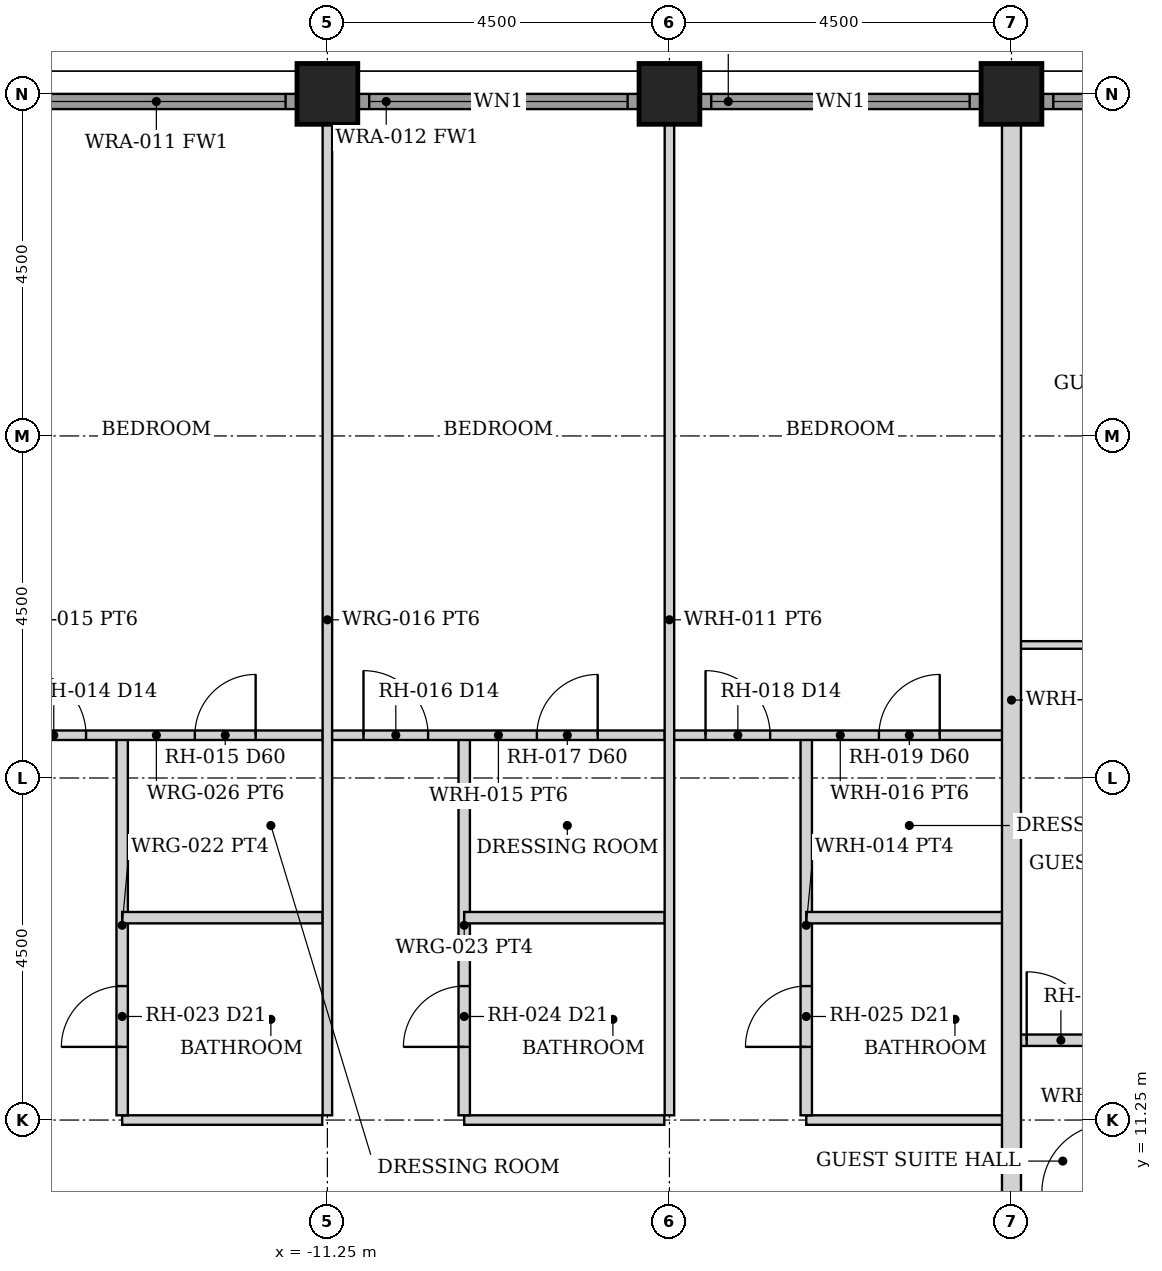
"""IFC4 building model, lengths in metres.
Left out: names, types, materials, properties, quantities, classifications, styles, units other than length and angle.
Written with IfcOpenShell. Run it as: python <this file> out.ifc"""

import sys

from ifc_helpers import new_model, si_unit, direction, frame, frame_2d, origin, origin_2d, place, context, subcontext, project, spatial, rectangle, hollow_rectangle, extrude, element, fill, save


model = new_model("IFC4")
c1 = context("Model", 3, precision=1e-05, world=origin(), true_north=direction((0.0, 1.0)))
c2 = subcontext(c1, "Body", "Model", "MODEL_VIEW")
j1 = project(units=[si_unit("LENGTHUNIT", "METRE"), si_unit("PLANEANGLEUNIT", "RADIAN")], contexts=[c1])
p1 = place(None, origin())
s1 = spatial("IfcSite", under=j1, at=p1, CompositionType="ELEMENT")
p2 = place(p1, origin())
s2 = spatial("IfcBuilding", under=s1, at=p2, CompositionType="ELEMENT")
p3 = place(p2, frame((0.0, 0.0, 100.0)))
s3 = spatial("IfcBuildingStorey", under=s2, at=p3, CompositionType="ELEMENT", Elevation=100.0)
for number, where, z_axis, x_axis in (
    (1, (-11.25, 24.75, 0.0), (0.0, 0.0, 1.0), (0.0, 1.0, 0.0)),
    (2, (-6.75, 24.75, 0.0), (0.0, 0.0, 1.0), (0.0, 1.0, 0.0)),
    (3, (-2.25, 24.75, 0.0), (0.0, 0.0, 1.0), (0.0, 1.0, 0.0)),
):
    element("IfcColumn", number, at=place(p3, frame(where, z_axis=z_axis, x_axis=x_axis)), inside=s3, PredefinedType="COLUMN", context=c2, shape_type="SweptSolid", body=[
        extrude(hollow_rectangle(XDim=0.8, YDim=0.8, WallThickness=0.06, at=origin_2d()), origin(), (0.0, 0.0, 1.0), 3.5),
    ])
p4 = place(p3, frame((-15.345, 24.65, 0.0), z_axis=(0.0, 0.0, 1.0), x_axis=(1.0, 0.0, 0.0)))
e4 = element("IfcWall", 4, at=p4, inside=s3, PredefinedType="SOLIDWALL", context=c2, shape_type="SweptSolid", body=[
    extrude(rectangle(XDim=3.69, YDim=0.2, at=frame_2d((1.845, 0.0))), origin(), (0.0, 0.0, 1.0), 2.379),
])
p5 = place(p4, frame((0.145, 0.0, 0.3)))
e5 = element("IfcOpeningElement", 5, at=p5, cuts=e4, PredefinedType="OPENING", context=c2, shape_type="SweptSolid", body=[
    extrude(rectangle(XDim=3.4, YDim=1.929, at=frame_2d((1.7, 0.964))), frame((0.0, 0.11, 0.0), z_axis=(0.0, -1.0, 0.0), x_axis=(1.0, 0.0, 0.0)), (0.0, 0.0, 1.0), 0.22),
])
p6 = place(p3, frame((-10.845, 24.65, 0.0), z_axis=(0.0, 0.0, 1.0), x_axis=(1.0, 0.0, 0.0)))
e6 = element("IfcWall", 6, at=p6, inside=s3, PredefinedType="SOLIDWALL", context=c2, shape_type="SweptSolid", body=[
    extrude(rectangle(XDim=3.69, YDim=0.2, at=frame_2d((1.845, 0.0))), origin(), (0.0, 0.0, 1.0), 2.379),
])
p7 = place(p6, frame((0.145, 0.0, 0.3)))
e7 = element("IfcOpeningElement", 7, at=p7, cuts=e6, PredefinedType="OPENING", context=c2, shape_type="SweptSolid", body=[
    extrude(rectangle(XDim=3.4, YDim=1.929, at=frame_2d((1.7, 0.964))), frame((0.0, 0.11, 0.0), z_axis=(0.0, -1.0, 0.0), x_axis=(1.0, 0.0, 0.0)), (0.0, 0.0, 1.0), 0.22),
])
p8 = place(p3, frame((-6.345, 24.65, 0.0), z_axis=(0.0, 0.0, 1.0), x_axis=(1.0, 0.0, 0.0)))
e8 = element("IfcWall", 8, at=p8, inside=s3, PredefinedType="SOLIDWALL", context=c2, shape_type="SweptSolid", body=[
    extrude(rectangle(XDim=3.69, YDim=0.2, at=frame_2d((1.845, 0.0))), origin(), (0.0, 0.0, 1.0), 2.379),
])
p9 = place(p8, frame((0.145, 0.0, 0.3)))
e9 = element("IfcOpeningElement", 9, at=p9, cuts=e8, PredefinedType="OPENING", context=c2, shape_type="SweptSolid", body=[
    extrude(rectangle(XDim=3.4, YDim=1.929, at=frame_2d((1.7, 0.964))), frame((0.0, 0.11, 0.0), z_axis=(0.0, -1.0, 0.0), x_axis=(1.0, 0.0, 0.0)), (0.0, 0.0, 1.0), 0.22),
])
p10 = place(p3, frame((-1.845, 24.65, 0.0), z_axis=(0.0, 0.0, 1.0), x_axis=(1.0, 0.0, 0.0)))
e10 = element("IfcWall", 10, at=p10, inside=s3, PredefinedType="SOLIDWALL", context=c2, shape_type="SweptSolid", body=[
    extrude(rectangle(XDim=3.69, YDim=0.2, at=frame_2d((1.845, 0.0))), origin(), (0.0, 0.0, 1.0), 2.379),
])
p11 = place(p10, frame((0.145, 0.0, 0.3)))
e11 = element("IfcOpeningElement", 11, at=p11, cuts=e10, PredefinedType="OPENING", context=c2, shape_type="SweptSolid", body=[
    extrude(rectangle(XDim=3.4, YDim=1.929, at=frame_2d((1.7, 0.964))), frame((0.0, 0.11, 0.0), z_axis=(0.0, -1.0, 0.0), x_axis=(1.0, 0.0, 0.0)), (0.0, 0.0, 1.0), 0.22),
])
p12 = place(p3, frame((-13.95, 11.25, 0.0), z_axis=(0.0, 0.0, 1.0), x_axis=(1.0, 0.0, 0.0)))
e12 = element("IfcWall", 12, at=p12, inside=s3, PredefinedType="PARTITIONING", context=c2, shape_type="SweptSolid", body=[
    extrude(rectangle(XDim=2.633, YDim=0.125, at=frame_2d((1.316, 0.0))), origin(), (0.0, 0.0, 1.0), 2.373),
])
p13 = place(p3, frame((-13.95, 11.312, 0.0), z_axis=(0.0, 0.0, 1.0), x_axis=(0.0, 1.0, 0.0)))
e13 = element("IfcWall", 13, at=p13, inside=s3, PredefinedType="PARTITIONING", context=c2, shape_type="SweptSolid", body=[
    extrude(rectangle(XDim=5.0, YDim=0.15, at=frame_2d((2.5, 0.0))), origin(), (0.0, 0.0, 1.0), 2.373),
])
p14 = place(p13, frame((0.9, 0.0, 0.0)))
e14 = element("IfcOpeningElement", 14, at=p14, cuts=e13, PredefinedType="OPENING", context=c2, shape_type="SweptSolid", body=[
    extrude(rectangle(XDim=0.8, YDim=2.1, at=frame_2d((0.4, 1.05))), frame((0.0, 0.085, 0.0), z_axis=(0.0, -1.0, 0.0), x_axis=(1.0, 0.0, 0.0)), (0.0, 0.0, 1.0), 0.17),
])
p15 = place(p3, frame((-15.688, 16.312, 0.0), z_axis=(0.0, 0.0, 1.0), x_axis=(1.0, 0.0, 0.0)))
e15 = element("IfcWall", 15, at=p15, inside=s3, PredefinedType="PARTITIONING", context=c2, shape_type="SweptSolid", body=[
    extrude(rectangle(XDim=4.375, YDim=0.125, at=frame_2d((2.188, 0.0))), origin(), (0.0, 0.0, 1.0), 2.373),
])
p16 = place(p15, frame((0.413, 0.0, 0.0)))
e16 = element("IfcOpeningElement", 16, at=p16, cuts=e15, PredefinedType="OPENING", context=c2, shape_type="SweptSolid", body=[
    extrude(rectangle(XDim=0.85, YDim=2.1, at=frame_2d((0.425, 1.05))), frame((0.0, 0.073, 0.0), z_axis=(0.0, -1.0, 0.0), x_axis=(1.0, 0.0, 0.0)), (0.0, 0.0, 1.0), 0.145),
])
p17 = place(p15, frame((2.694, 0.0, 0.0)))
e17 = element("IfcOpeningElement", 17, at=p17, cuts=e15, PredefinedType="OPENING", context=c2, shape_type="SweptSolid", body=[
    extrude(rectangle(XDim=0.8, YDim=2.1, at=frame_2d((0.4, 1.05))), frame((0.0, 0.073, 0.0), z_axis=(0.0, -1.0, 0.0), x_axis=(1.0, 0.0, 0.0)), (0.0, 0.0, 1.0), 0.145),
])
p18 = place(p3, frame((-13.95, 13.913, 0.0), z_axis=(0.0, 0.0, 1.0), x_axis=(1.0, 0.0, 0.0)))
e18 = element("IfcWall", 18, at=p18, inside=s3, PredefinedType="PARTITIONING", context=c2, shape_type="SweptSolid", body=[
    extrude(rectangle(XDim=2.637, YDim=0.15, at=frame_2d((1.319, 0.0))), origin(), (0.0, 0.0, 1.0), 2.373),
])
p19 = place(p3, frame((-11.25, 11.312, 0.0), z_axis=(0.0, 0.0, 1.0), x_axis=(0.0, 1.0, 0.0)))
e19 = element("IfcWall", 19, at=p19, inside=s3, PredefinedType="PARTITIONING", context=c2, shape_type="SweptSolid", body=[
    extrude(rectangle(XDim=13.038, YDim=0.125, at=frame_2d((6.519, 0.0))), origin(), (0.0, 0.0, 1.0), 2.373),
])
p20 = place(p3, frame((-9.45, 11.25, 0.0), z_axis=(0.0, 0.0, 1.0), x_axis=(1.0, 0.0, 0.0)))
e20 = element("IfcWall", 20, at=p20, inside=s3, PredefinedType="PARTITIONING", context=c2, shape_type="SweptSolid", body=[
    extrude(rectangle(XDim=2.633, YDim=0.125, at=frame_2d((1.316, 0.0))), origin(), (0.0, 0.0, 1.0), 2.373),
])
p21 = place(p3, frame((-9.45, 11.312, 0.0), z_axis=(0.0, 0.0, 1.0), x_axis=(0.0, 1.0, 0.0)))
e21 = element("IfcWall", 21, at=p21, inside=s3, PredefinedType="PARTITIONING", context=c2, shape_type="SweptSolid", body=[
    extrude(rectangle(XDim=5.0, YDim=0.15, at=frame_2d((2.5, 0.0))), origin(), (0.0, 0.0, 1.0), 2.373),
])
p22 = place(p21, frame((0.9, 0.0, 0.0)))
e22 = element("IfcOpeningElement", 22, at=p22, cuts=e21, PredefinedType="OPENING", context=c2, shape_type="SweptSolid", body=[
    extrude(rectangle(XDim=0.8, YDim=2.1, at=frame_2d((0.4, 1.05))), frame((0.0, 0.085, 0.0), z_axis=(0.0, -1.0, 0.0), x_axis=(1.0, 0.0, 0.0)), (0.0, 0.0, 1.0), 0.17),
])
p23 = place(p3, frame((-11.188, 16.312, 0.0), z_axis=(0.0, 0.0, 1.0), x_axis=(1.0, 0.0, 0.0)))
e23 = element("IfcWall", 23, at=p23, inside=s3, PredefinedType="PARTITIONING", context=c2, shape_type="SweptSolid", body=[
    extrude(rectangle(XDim=4.375, YDim=0.125, at=frame_2d((2.188, 0.0))), origin(), (0.0, 0.0, 1.0), 2.373),
])
p24 = place(p23, frame((0.413, 0.0, 0.0)))
e24 = element("IfcOpeningElement", 24, at=p24, cuts=e23, PredefinedType="OPENING", context=c2, shape_type="SweptSolid", body=[
    extrude(rectangle(XDim=0.85, YDim=2.1, at=frame_2d((0.425, 1.05))), frame((0.0, 0.073, 0.0), z_axis=(0.0, -1.0, 0.0), x_axis=(1.0, 0.0, 0.0)), (0.0, 0.0, 1.0), 0.145),
])
p25 = place(p23, frame((2.694, 0.0, 0.0)))
e25 = element("IfcOpeningElement", 25, at=p25, cuts=e23, PredefinedType="OPENING", context=c2, shape_type="SweptSolid", body=[
    extrude(rectangle(XDim=0.8, YDim=2.1, at=frame_2d((0.4, 1.05))), frame((0.0, 0.073, 0.0), z_axis=(0.0, -1.0, 0.0), x_axis=(1.0, 0.0, 0.0)), (0.0, 0.0, 1.0), 0.145),
])
p26 = place(p3, frame((-9.45, 13.913, 0.0), z_axis=(0.0, 0.0, 1.0), x_axis=(1.0, 0.0, 0.0)))
e26 = element("IfcWall", 26, at=p26, inside=s3, PredefinedType="PARTITIONING", context=c2, shape_type="SweptSolid", body=[
    extrude(rectangle(XDim=2.637, YDim=0.15, at=frame_2d((1.319, 0.0))), origin(), (0.0, 0.0, 1.0), 2.373),
])
p27 = place(p3, frame((-6.75, 11.312, 0.0), z_axis=(0.0, 0.0, 1.0), x_axis=(0.0, 1.0, 0.0)))
e27 = element("IfcWall", 27, at=p27, inside=s3, PredefinedType="PARTITIONING", context=c2, shape_type="SweptSolid", body=[
    extrude(rectangle(XDim=13.038, YDim=0.125, at=frame_2d((6.519, 0.0))), origin(), (0.0, 0.0, 1.0), 2.373),
])
p28 = place(p3, frame((-4.95, 11.25, 0.0), z_axis=(0.0, 0.0, 1.0), x_axis=(1.0, 0.0, 0.0)))
e28 = element("IfcWall", 28, at=p28, inside=s3, PredefinedType="PARTITIONING", context=c2, shape_type="SweptSolid", body=[
    extrude(rectangle(XDim=2.633, YDim=0.125, at=frame_2d((1.316, 0.0))), origin(), (0.0, 0.0, 1.0), 2.373),
])
p29 = place(p3, frame((-4.95, 11.312, 0.0), z_axis=(0.0, 0.0, 1.0), x_axis=(0.0, 1.0, 0.0)))
e29 = element("IfcWall", 29, at=p29, inside=s3, PredefinedType="PARTITIONING", context=c2, shape_type="SweptSolid", body=[
    extrude(rectangle(XDim=5.0, YDim=0.15, at=frame_2d((2.5, 0.0))), origin(), (0.0, 0.0, 1.0), 2.373),
])
p30 = place(p29, frame((0.9, 0.0, 0.0)))
e30 = element("IfcOpeningElement", 30, at=p30, cuts=e29, PredefinedType="OPENING", context=c2, shape_type="SweptSolid", body=[
    extrude(rectangle(XDim=0.8, YDim=2.1, at=frame_2d((0.4, 1.05))), frame((0.0, 0.085, 0.0), z_axis=(0.0, -1.0, 0.0), x_axis=(1.0, 0.0, 0.0)), (0.0, 0.0, 1.0), 0.17),
])
p31 = place(p3, frame((-6.688, 16.312, 0.0), z_axis=(0.0, 0.0, 1.0), x_axis=(1.0, 0.0, 0.0)))
e31 = element("IfcWall", 31, at=p31, inside=s3, PredefinedType="PARTITIONING", context=c2, shape_type="SweptSolid", body=[
    extrude(rectangle(XDim=4.37, YDim=0.125, at=frame_2d((2.185, 0.0))), origin(), (0.0, 0.0, 1.0), 2.373),
])
p32 = place(p31, frame((0.413, 0.0, 0.0)))
e32 = element("IfcOpeningElement", 32, at=p32, cuts=e31, PredefinedType="OPENING", context=c2, shape_type="SweptSolid", body=[
    extrude(rectangle(XDim=0.85, YDim=2.1, at=frame_2d((0.425, 1.05))), frame((0.0, 0.073, 0.0), z_axis=(0.0, -1.0, 0.0), x_axis=(1.0, 0.0, 0.0)), (0.0, 0.0, 1.0), 0.145),
])
p33 = place(p31, frame((2.694, 0.0, 0.0)))
e33 = element("IfcOpeningElement", 33, at=p33, cuts=e31, PredefinedType="OPENING", context=c2, shape_type="SweptSolid", body=[
    extrude(rectangle(XDim=0.8, YDim=2.1, at=frame_2d((0.4, 1.05))), frame((0.0, 0.073, 0.0), z_axis=(0.0, -1.0, 0.0), x_axis=(1.0, 0.0, 0.0)), (0.0, 0.0, 1.0), 0.145),
])
p34 = place(p3, frame((-4.95, 13.913, 0.0), z_axis=(0.0, 0.0, 1.0), x_axis=(1.0, 0.0, 0.0)))
e34 = element("IfcWall", 34, at=p34, inside=s3, PredefinedType="PARTITIONING", context=c2, shape_type="SweptSolid", body=[
    extrude(rectangle(XDim=2.633, YDim=0.15, at=frame_2d((1.316, 0.0))), origin(), (0.0, 0.0, 1.0), 2.373),
])
p35 = place(p3, frame((-2.15, 12.3, 0.0), z_axis=(0.0, 0.0, 1.0), x_axis=(1.0, 0.0, 0.0)))
e35 = element("IfcWall", 35, at=p35, inside=s3, PredefinedType="PARTITIONING", context=c2, shape_type="SweptSolid", body=[
    extrude(rectangle(XDim=4.3, YDim=0.15, at=frame_2d((2.15, 0.0))), origin(), (0.0, 0.0, 1.0), 2.373),
])
p36 = place(p35, frame((0.1, 0.0, 0.0)))
e36 = element("IfcOpeningElement", 36, at=p36, cuts=e35, PredefinedType="OPENING", context=c2, shape_type="SweptSolid", body=[
    extrude(rectangle(XDim=0.9, YDim=2.1, at=frame_2d((0.45, 1.05))), frame((0.0, 0.085, 0.0), z_axis=(0.0, -1.0, 0.0), x_axis=(1.0, 0.0, 0.0)), (0.0, 0.0, 1.0), 0.17),
])
p37 = place(p3, frame((-2.15, 17.5, 0.0), z_axis=(0.0, 0.0, 1.0), x_axis=(1.0, 0.0, 0.0)))
e37 = element("IfcWall", 37, at=p37, inside=s3, PredefinedType="PARTITIONING", context=c2, shape_type="SweptSolid", body=[
    extrude(rectangle(XDim=4.3, YDim=0.1, at=frame_2d((2.15, 0.0))), origin(), (0.0, 0.0, 1.0), 2.373),
])
p38 = place(p37, frame((1.725, 0.0, 0.0)))
e38 = element("IfcOpeningElement", 38, at=p38, cuts=e37, PredefinedType="OPENING", context=c2, shape_type="SweptSolid", body=[
    extrude(rectangle(XDim=0.85, YDim=2.1, at=frame_2d((0.425, 1.05))), frame((0.0, 0.06, 0.0), z_axis=(0.0, -1.0, 0.0), x_axis=(1.0, 0.0, 0.0)), (0.0, 0.0, 1.0), 0.12),
])
p39 = place(p3, frame((-2.25, 9.2, 0.0), z_axis=(0.0, 0.0, 1.0), x_axis=(0.0, 1.0, 0.0)))
e39 = element("IfcWall", 39, at=p39, inside=s3, PredefinedType="PARTITIONING", context=c2, shape_type="SweptSolid", body=[
    extrude(rectangle(XDim=15.15, YDim=0.25, at=frame_2d((7.575, 0.0))), origin(), (0.0, 0.0, 1.0), 2.373),
])
p40 = place(p5, origin())
e40 = element("IfcWindow", 40, at=p40, inside=s3, PartitioningType="SINGLE_PANEL", PredefinedType="WINDOW", context=c2, shape_type="SweptSolid", body=[
    extrude(rectangle(XDim=3.4, YDim=1.929, at=frame_2d((1.7, 0.964))), frame((0.0, 0.03, 0.0), z_axis=(0.0, -1.0, 0.0), x_axis=(1.0, 0.0, 0.0)), (0.0, 0.0, 1.0), 0.06),
])
fill(e5, e40)
p41 = place(p7, origin())
e41 = element("IfcWindow", 41, at=p41, inside=s3, PartitioningType="SINGLE_PANEL", PredefinedType="WINDOW", context=c2, shape_type="SweptSolid", body=[
    extrude(rectangle(XDim=3.4, YDim=1.929, at=frame_2d((1.7, 0.964))), frame((0.0, 0.03, 0.0), z_axis=(0.0, -1.0, 0.0), x_axis=(1.0, 0.0, 0.0)), (0.0, 0.0, 1.0), 0.06),
])
fill(e7, e41)
p42 = place(p9, origin())
e42 = element("IfcWindow", 42, at=p42, inside=s3, PartitioningType="SINGLE_PANEL", PredefinedType="WINDOW", context=c2, shape_type="SweptSolid", body=[
    extrude(rectangle(XDim=3.4, YDim=1.929, at=frame_2d((1.7, 0.964))), frame((0.0, 0.03, 0.0), z_axis=(0.0, -1.0, 0.0), x_axis=(1.0, 0.0, 0.0)), (0.0, 0.0, 1.0), 0.06),
])
fill(e9, e42)
p43 = place(p11, origin())
e43 = element("IfcWindow", 43, at=p43, inside=s3, PartitioningType="SINGLE_PANEL", PredefinedType="WINDOW", context=c2, shape_type="SweptSolid", body=[
    extrude(rectangle(XDim=3.4, YDim=1.929, at=frame_2d((1.7, 0.964))), frame((0.0, 0.03, 0.0), z_axis=(0.0, -1.0, 0.0), x_axis=(1.0, 0.0, 0.0)), (0.0, 0.0, 1.0), 0.06),
])
fill(e11, e43)
p44 = place(p16, origin())
e44 = element("IfcDoor", 44, at=p44, inside=s3, OperationType="SINGLE_SWING_LEFT", PredefinedType="DOOR", context=c2, shape_type="SweptSolid", body=[
    extrude(rectangle(XDim=0.85, YDim=2.1, at=frame_2d((0.425, 1.05))), frame((0.0, 0.025, 0.0), z_axis=(0.0, -1.0, 0.0), x_axis=(1.0, 0.0, 0.0)), (0.0, 0.0, 1.0), 0.05),
])
fill(e16, e44)
p45 = place(p14, origin())
e45 = element("IfcDoor", 45, at=p45, inside=s3, OperationType="SINGLE_SWING_LEFT", PredefinedType="DOOR", context=c2, shape_type="SweptSolid", body=[
    extrude(rectangle(XDim=0.8, YDim=2.1, at=frame_2d((0.4, 1.05))), frame((0.0, 0.025, 0.0), z_axis=(0.0, -1.0, 0.0), x_axis=(1.0, 0.0, 0.0)), (0.0, 0.0, 1.0), 0.05),
])
fill(e14, e45)
p46 = place(p17, origin())
e46 = element("IfcDoor", 46, at=p46, inside=s3, OperationType="SINGLE_SWING_RIGHT", PredefinedType="DOOR", context=c2, shape_type="SweptSolid", body=[
    extrude(rectangle(XDim=0.8, YDim=2.1, at=frame_2d((0.4, 1.05))), frame((0.0, 0.025, 0.0), z_axis=(0.0, -1.0, 0.0), x_axis=(1.0, 0.0, 0.0)), (0.0, 0.0, 1.0), 0.05),
])
fill(e17, e46)
p47 = place(p24, origin())
e47 = element("IfcDoor", 47, at=p47, inside=s3, OperationType="SINGLE_SWING_LEFT", PredefinedType="DOOR", context=c2, shape_type="SweptSolid", body=[
    extrude(rectangle(XDim=0.85, YDim=2.1, at=frame_2d((0.425, 1.05))), frame((0.0, 0.025, 0.0), z_axis=(0.0, -1.0, 0.0), x_axis=(1.0, 0.0, 0.0)), (0.0, 0.0, 1.0), 0.05),
])
fill(e24, e47)
p48 = place(p22, origin())
e48 = element("IfcDoor", 48, at=p48, inside=s3, OperationType="SINGLE_SWING_LEFT", PredefinedType="DOOR", context=c2, shape_type="SweptSolid", body=[
    extrude(rectangle(XDim=0.8, YDim=2.1, at=frame_2d((0.4, 1.05))), frame((0.0, 0.025, 0.0), z_axis=(0.0, -1.0, 0.0), x_axis=(1.0, 0.0, 0.0)), (0.0, 0.0, 1.0), 0.05),
])
fill(e22, e48)
p49 = place(p25, origin())
e49 = element("IfcDoor", 49, at=p49, inside=s3, OperationType="SINGLE_SWING_RIGHT", PredefinedType="DOOR", context=c2, shape_type="SweptSolid", body=[
    extrude(rectangle(XDim=0.8, YDim=2.1, at=frame_2d((0.4, 1.05))), frame((0.0, 0.025, 0.0), z_axis=(0.0, -1.0, 0.0), x_axis=(1.0, 0.0, 0.0)), (0.0, 0.0, 1.0), 0.05),
])
fill(e25, e49)
p50 = place(p32, origin())
e50 = element("IfcDoor", 50, at=p50, inside=s3, OperationType="SINGLE_SWING_LEFT", PredefinedType="DOOR", context=c2, shape_type="SweptSolid", body=[
    extrude(rectangle(XDim=0.85, YDim=2.1, at=frame_2d((0.425, 1.05))), frame((0.0, 0.025, 0.0), z_axis=(0.0, -1.0, 0.0), x_axis=(1.0, 0.0, 0.0)), (0.0, 0.0, 1.0), 0.05),
])
fill(e32, e50)
p51 = place(p30, origin())
e51 = element("IfcDoor", 51, at=p51, inside=s3, OperationType="SINGLE_SWING_LEFT", PredefinedType="DOOR", context=c2, shape_type="SweptSolid", body=[
    extrude(rectangle(XDim=0.8, YDim=2.1, at=frame_2d((0.4, 1.05))), frame((0.0, 0.025, 0.0), z_axis=(0.0, -1.0, 0.0), x_axis=(1.0, 0.0, 0.0)), (0.0, 0.0, 1.0), 0.05),
])
fill(e30, e51)
p52 = place(p33, origin())
e52 = element("IfcDoor", 52, at=p52, inside=s3, OperationType="SINGLE_SWING_RIGHT", PredefinedType="DOOR", context=c2, shape_type="SweptSolid", body=[
    extrude(rectangle(XDim=0.8, YDim=2.1, at=frame_2d((0.4, 1.05))), frame((0.0, 0.025, 0.0), z_axis=(0.0, -1.0, 0.0), x_axis=(1.0, 0.0, 0.0)), (0.0, 0.0, 1.0), 0.05),
])
fill(e33, e52)
p53 = place(p36, origin())
e53 = element("IfcDoor", 53, at=p53, inside=s3, OperationType="SINGLE_SWING_LEFT", PredefinedType="DOOR", context=c2, shape_type="SweptSolid", body=[
    extrude(rectangle(XDim=0.9, YDim=2.1, at=frame_2d((0.45, 1.05))), frame((0.0, 0.025, 0.0), z_axis=(0.0, -1.0, 0.0), x_axis=(1.0, 0.0, 0.0)), (0.0, 0.0, 1.0), 0.05),
])
fill(e36, e53)
save(model, sys.argv[1])
